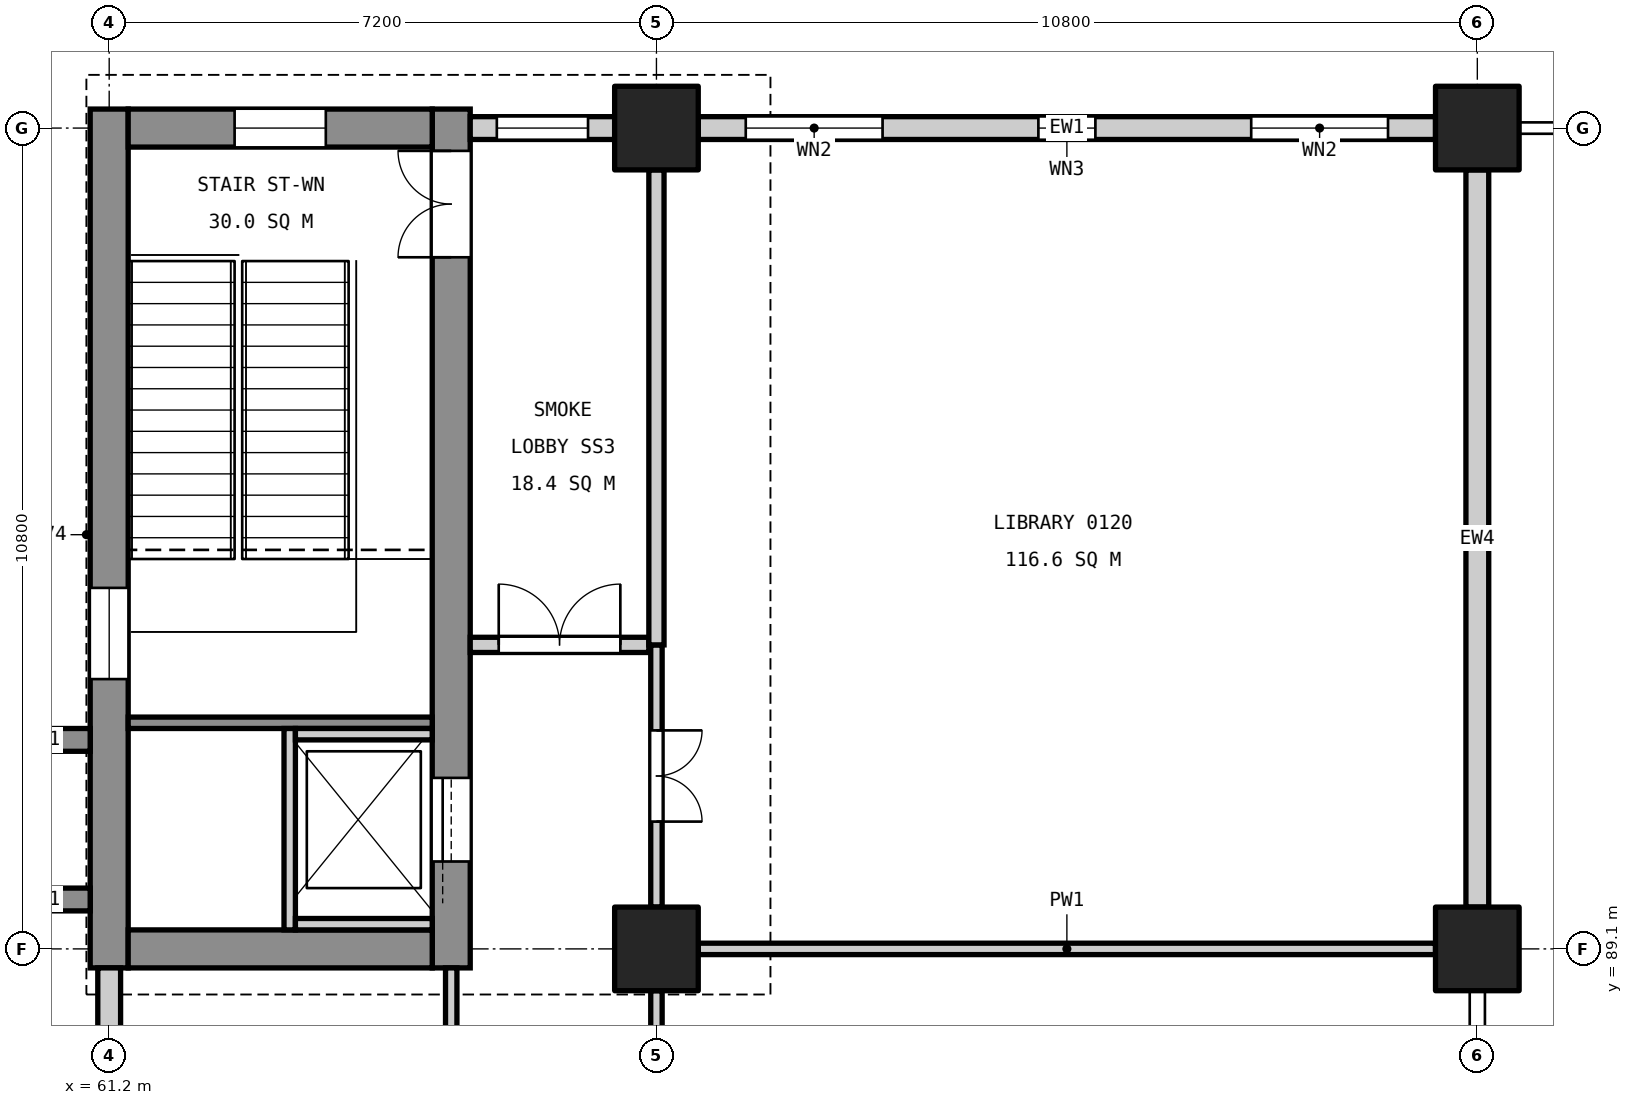
"""IFC4 building model, lengths in metres.
Left out: names, types, materials, properties, quantities, classifications, styles, units other than length and angle.
Written with IfcOpenShell. Run it as: python <this file> out.ifc"""

import sys

from ifc_helpers import new_model, si_unit, direction, frame, frame_2d, origin, origin_2d, place, context, subcontext, project, spatial, rectangle, extrude, element, fill, save


model = new_model("IFC4")
c1 = context("Model", 3, precision=1e-05, world=origin(), true_north=direction((0.0, 1.0)))
c2 = subcontext(c1, "Body", "Model", "MODEL_VIEW")
j1 = project(units=[si_unit("LENGTHUNIT", "METRE"), si_unit("PLANEANGLEUNIT", "RADIAN")], contexts=[c1])
p1 = place(None, origin())
s1 = spatial("IfcSite", under=j1, at=p1, CompositionType="ELEMENT")
p2 = place(p1, origin())
s2 = spatial("IfcBuilding", under=s1, at=p2, CompositionType="ELEMENT")
p3 = place(p2, frame((0.0, 0.0, 6.0)))
s3 = spatial("IfcBuildingStorey", under=s2, at=p3, CompositionType="ELEMENT", Elevation=6.0)
for number, where, z_axis, x_axis in (
    (1, (68.4, 89.1, 0.0), (0.0, 0.0, 1.0), (1.0, 0.0, 0.0)),
    (2, (68.4, 99.9, 0.0), (0.0, 0.0, 1.0), (1.0, 0.0, 0.0)),
    (3, (79.2, 89.1, 0.0), (0.0, 0.0, 1.0), (1.0, 0.0, 0.0)),
    (4, (79.2, 99.9, 0.0), (0.0, 0.0, 1.0), (1.0, 0.0, 0.0)),
):
    element("IfcColumn", number, at=place(p3, frame(where, z_axis=z_axis, x_axis=x_axis)), inside=s3, PredefinedType="COLUMN", context=c2, shape_type="SweptSolid", body=[
        extrude(rectangle(XDim=1.1, YDim=1.1, at=origin_2d()), origin(), (0.0, 0.0, 1.0), 5.4),
    ])
p4 = place(p3, frame((61.2, 88.85, 0.0), z_axis=(0.0, 0.0, 1.0), x_axis=(0.0, 1.0, 0.0)))
e5 = element("IfcWall", 5, at=p4, inside=s3, PredefinedType="SHEAR", context=c2, shape_type="SweptSolid", body=[
    extrude(rectangle(XDim=11.3, YDim=0.5, at=frame_2d((5.65, 0.0))), origin(), (0.0, 0.0, 1.0), 5.1),
])
p5 = place(p4, frame((3.8, 0.0, 3.4)))
e6 = element("IfcOpeningElement", 6, at=p5, cuts=e5, PredefinedType="OPENING", context=c2, shape_type="SweptSolid", body=[
    extrude(rectangle(XDim=1.2, YDim=0.9, at=frame_2d((0.6, 0.45))), frame((0.0, 0.26, 0.0), z_axis=(0.0, -1.0, 0.0), x_axis=(1.0, 0.0, 0.0)), (0.0, 0.0, 1.0), 0.52),
])
p6 = place(p3, frame((65.7, 88.85, 0.0), z_axis=(0.0, 0.0, 1.0), x_axis=(0.0, 1.0, 0.0)))
e7 = element("IfcWall", 7, at=p6, inside=s3, PredefinedType="SHEAR", context=c2, shape_type="SweptSolid", body=[
    extrude(rectangle(XDim=11.3, YDim=0.5, at=frame_2d((5.65, 0.0))), origin(), (0.0, 0.0, 1.0), 5.1),
])
p7 = place(p6, frame((9.35, 0.0, 0.0)))
e8 = element("IfcOpeningElement", 8, at=p7, cuts=e7, PredefinedType="OPENING", context=c2, shape_type="SweptSolid", body=[
    extrude(rectangle(XDim=1.4, YDim=2.1, at=frame_2d((0.7, 1.05))), frame((0.0, 0.26, 0.0), z_axis=(0.0, -1.0, 0.0), x_axis=(1.0, 0.0, 0.0)), (0.0, 0.0, 1.0), 0.52),
])
p8 = place(p6, frame((1.4, 0.0, 0.0)))
e9 = element("IfcOpeningElement", 9, at=p8, cuts=e7, PredefinedType="OPENING", context=c2, shape_type="SweptSolid", body=[
    extrude(rectangle(XDim=1.1, YDim=2.1, at=frame_2d((0.55, 1.05))), frame((0.0, 0.26, 0.0), z_axis=(0.0, -1.0, 0.0), x_axis=(1.0, 0.0, 0.0)), (0.0, 0.0, 1.0), 0.52),
])
p9 = place(p3, frame((61.45, 89.1, 0.0), z_axis=(0.0, 0.0, 1.0), x_axis=(1.0, 0.0, 0.0)))
e10 = element("IfcWall", 10, at=p9, inside=s3, PredefinedType="SHEAR", context=c2, shape_type="SweptSolid", body=[
    extrude(rectangle(XDim=4.0, YDim=0.5, at=frame_2d((2.0, 0.0))), origin(), (0.0, 0.0, 1.0), 5.1),
])
p10 = place(p3, frame((61.45, 99.9, 0.0), z_axis=(0.0, 0.0, 1.0), x_axis=(1.0, 0.0, 0.0)))
e11 = element("IfcWall", 11, at=p10, inside=s3, PredefinedType="SHEAR", context=c2, shape_type="SweptSolid", body=[
    extrude(rectangle(XDim=4.0, YDim=0.5, at=frame_2d((2.0, 0.0))), origin(), (0.0, 0.0, 1.0), 5.1),
])
p11 = place(p10, frame((1.4, 0.0, 3.4)))
e12 = element("IfcOpeningElement", 12, at=p11, cuts=e11, PredefinedType="OPENING", context=c2, shape_type="SweptSolid", body=[
    extrude(rectangle(XDim=1.2, YDim=0.9, at=frame_2d((0.6, 0.45))), frame((0.0, 0.26, 0.0), z_axis=(0.0, -1.0, 0.0), x_axis=(1.0, 0.0, 0.0)), (0.0, 0.0, 1.0), 0.52),
])
for number, where, z_axis, x_axis in (
    (13, (60.95, 89.75, 0.0), (0.0, 0.0, 1.0), (-1.0, 0.0, 0.0)),
    (14, (60.95, 91.85, 0.0), (0.0, 0.0, 1.0), (-1.0, 0.0, 0.0)),
):
    element("IfcWall", number, at=place(p3, frame(where, z_axis=z_axis, x_axis=x_axis)), inside=s3, PredefinedType="SHEAR", context=c2, shape_type="SweptSolid", body=[
        extrude(rectangle(XDim=1.25, YDim=0.3, at=frame_2d((0.625, 0.0))), origin(), (0.0, 0.0, 1.0), 5.4),
    ])
p12 = place(p3, frame((61.45, 92.075, 0.0), z_axis=(0.0, 0.0, 1.0), x_axis=(1.0, 0.0, 0.0)))
e15 = element("IfcWall", 15, at=p12, inside=s3, PredefinedType="SOLIDWALL", context=c2, shape_type="SweptSolid", body=[
    extrude(rectangle(XDim=4.0, YDim=0.15, at=frame_2d((2.0, 0.0))), origin(), (0.0, 0.0, 1.0), 5.1),
])
p13 = place(p3, frame((63.575, 92.0, 0.0), z_axis=(0.0, 0.0, 1.0), x_axis=(0.0, -1.0, 0.0)))
e16 = element("IfcWall", 16, at=p13, inside=s3, PredefinedType="SOLIDWALL", context=c2, shape_type="SweptSolid", body=[
    extrude(rectangle(XDim=2.65, YDim=0.15, at=frame_2d((1.325, 0.0))), origin(), (0.0, 0.0, 1.0), 5.4),
])
for number, where, z_axis, x_axis in (
    (17, (63.65, 91.925, 0.0), (0.0, 0.0, 1.0), (1.0, 0.0, 0.0)),
    (18, (63.65, 89.425, 0.0), (0.0, 0.0, 1.0), (1.0, 0.0, 0.0)),
):
    element("IfcWall", number, at=place(p3, frame(where, z_axis=z_axis, x_axis=x_axis)), inside=s3, PredefinedType="SOLIDWALL", context=c2, shape_type="SweptSolid", body=[
        extrude(rectangle(XDim=1.8, YDim=0.15, at=frame_2d((0.9, 0.0))), origin(), (0.0, 0.0, 1.0), 5.4),
    ])
p14 = place(p3, frame((61.2, 78.85, 0.0), z_axis=(0.0, 0.0, 1.0), x_axis=(0.0, 1.0, 0.0)))
e19 = element("IfcWall", 19, at=p14, inside=s3, PredefinedType="STANDARD", context=c2, shape_type="SweptSolid", body=[
    extrude(rectangle(XDim=10.0, YDim=0.3, at=frame_2d((5.0, 0.0))), origin(), (0.0, 0.0, 1.0), 4.1),
])
p15 = place(p14, frame((0.625, 0.0, 0.9)))
e20 = element("IfcOpeningElement", 20, at=p15, cuts=e19, PredefinedType="OPENING", context=c2, shape_type="SweptSolid", body=[
    extrude(rectangle(XDim=1.8, YDim=3.0, at=frame_2d((0.9, 1.5))), frame((0.0, 0.16, 0.0), z_axis=(0.0, -1.0, 0.0), x_axis=(1.0, 0.0, 0.0)), (0.0, 0.0, 1.0), 0.32),
])
p16 = place(p14, frame((3.95, 0.0, 0.9)))
e21 = element("IfcOpeningElement", 21, at=p16, cuts=e19, PredefinedType="OPENING", context=c2, shape_type="SweptSolid", body=[
    extrude(rectangle(XDim=1.8, YDim=3.0, at=frame_2d((0.9, 1.5))), frame((0.0, 0.16, 0.0), z_axis=(0.0, -1.0, 0.0), x_axis=(1.0, 0.0, 0.0)), (0.0, 0.0, 1.0), 0.32),
])
p17 = place(p14, frame((7.95, 0.0, 0.8)))
e22 = element("IfcOpeningElement", 22, at=p17, cuts=e19, PredefinedType="OPENING", context=c2, shape_type="SweptSolid", body=[
    extrude(rectangle(XDim=0.75, YDim=1.2, at=frame_2d((0.375, 0.6))), frame((0.0, 0.16, 0.0), z_axis=(0.0, -1.0, 0.0), x_axis=(1.0, 0.0, 0.0)), (0.0, 0.0, 1.0), 0.32),
])
p18 = place(p3, frame((65.95, 99.9, 0.0), z_axis=(0.0, 0.0, 1.0), x_axis=(1.0, 0.0, 0.0)))
e23 = element("IfcWall", 23, at=p18, inside=s3, PredefinedType="STANDARD", context=c2, shape_type="SweptSolid", body=[
    extrude(rectangle(XDim=1.9, YDim=0.3, at=frame_2d((0.95, 0.0))), origin(), (0.0, 0.0, 1.0), 4.3),
])
p19 = place(p18, frame((0.35, 0.0, 0.9)))
e24 = element("IfcOpeningElement", 24, at=p19, cuts=e23, PredefinedType="OPENING", context=c2, shape_type="SweptSolid", body=[
    extrude(rectangle(XDim=1.2, YDim=2.4, at=frame_2d((0.6, 1.2))), frame((0.0, 0.16, 0.0), z_axis=(0.0, -1.0, 0.0), x_axis=(1.0, 0.0, 0.0)), (0.0, 0.0, 1.0), 0.32),
])
p20 = place(p3, frame((68.95, 99.9, 0.0), z_axis=(0.0, 0.0, 1.0), x_axis=(1.0, 0.0, 0.0)))
e25 = element("IfcWall", 25, at=p20, inside=s3, PredefinedType="STANDARD", context=c2, shape_type="SweptSolid", body=[
    extrude(rectangle(XDim=9.7, YDim=0.3, at=frame_2d((4.85, 0.0))), origin(), (0.0, 0.0, 1.0), 4.3),
])
p21 = place(p20, frame((0.625, 0.0, 0.9)))
e26 = element("IfcOpeningElement", 26, at=p21, cuts=e25, PredefinedType="OPENING", context=c2, shape_type="SweptSolid", body=[
    extrude(rectangle(XDim=1.8, YDim=3.0, at=frame_2d((0.9, 1.5))), frame((0.0, 0.16, 0.0), z_axis=(0.0, -1.0, 0.0), x_axis=(1.0, 0.0, 0.0)), (0.0, 0.0, 1.0), 0.32),
])
p22 = place(p20, frame((4.475, 0.0, 0.8)))
e27 = element("IfcOpeningElement", 27, at=p22, cuts=e25, PredefinedType="OPENING", context=c2, shape_type="SweptSolid", body=[
    extrude(rectangle(XDim=0.75, YDim=1.2, at=frame_2d((0.375, 0.6))), frame((0.0, 0.16, 0.0), z_axis=(0.0, -1.0, 0.0), x_axis=(1.0, 0.0, 0.0)), (0.0, 0.0, 1.0), 0.32),
])
p23 = place(p20, frame((7.275, 0.0, 0.9)))
e28 = element("IfcOpeningElement", 28, at=p23, cuts=e25, PredefinedType="OPENING", context=c2, shape_type="SweptSolid", body=[
    extrude(rectangle(XDim=1.8, YDim=3.0, at=frame_2d((0.9, 1.5))), frame((0.0, 0.16, 0.0), z_axis=(0.0, -1.0, 0.0), x_axis=(1.0, 0.0, 0.0)), (0.0, 0.0, 1.0), 0.32),
])
p24 = place(p3, frame((79.2, 89.65, 0.0), z_axis=(0.0, 0.0, 1.0), x_axis=(0.0, 1.0, 0.0)))
e29 = element("IfcWall", 29, at=p24, inside=s3, PredefinedType="STANDARD", context=c2, shape_type="SweptSolid", body=[
    extrude(rectangle(XDim=9.7, YDim=0.3, at=frame_2d((4.85, 0.0))), origin(), (0.0, 0.0, 1.0), 4.0),
])
p25 = place(p3, frame((65.7, 78.45, 0.0), z_axis=(0.0, 0.0, 1.0), x_axis=(0.0, 1.0, 0.0)))
e30 = element("IfcWall", 30, at=p25, inside=s3, PredefinedType="PARTITIONING", context=c2, shape_type="SweptSolid", body=[
    extrude(rectangle(XDim=10.4, YDim=0.15, at=frame_2d((5.2, 0.0))), origin(), (0.0, 0.0, 1.0), 4.0),
])
p26 = place(p25, frame((1.15, 0.0, 0.0)))
e31 = element("IfcOpeningElement", 31, at=p26, cuts=e30, PredefinedType="OPENING", context=c2, shape_type="SweptSolid", body=[
    extrude(rectangle(XDim=1.0, YDim=2.1, at=frame_2d((0.5, 1.05))), frame((0.0, 0.085, 0.0), z_axis=(0.0, -1.0, 0.0), x_axis=(1.0, 0.0, 0.0)), (0.0, 0.0, 1.0), 0.17),
])
p27 = place(p25, frame((6.55, 0.0, 0.0)))
e32 = element("IfcOpeningElement", 32, at=p27, cuts=e30, PredefinedType="OPENING", context=c2, shape_type="SweptSolid", body=[
    extrude(rectangle(XDim=1.0, YDim=2.1, at=frame_2d((0.5, 1.05))), frame((0.0, 0.085, 0.0), z_axis=(0.0, -1.0, 0.0), x_axis=(1.0, 0.0, 0.0)), (0.0, 0.0, 1.0), 0.17),
])
p28 = place(p3, frame((65.95, 93.1, 0.0), z_axis=(0.0, 0.0, 1.0), x_axis=(1.0, 0.0, 0.0)))
e33 = element("IfcWall", 33, at=p28, inside=s3, PredefinedType="PARTITIONING", context=c2, shape_type="SweptSolid", body=[
    extrude(rectangle(XDim=2.35, YDim=0.2, at=frame_2d((1.175, 0.0))), origin(), (0.0, 0.0, 1.0), 4.0),
])
p29 = place(p28, frame((0.375, 0.0, 0.0)))
e34 = element("IfcOpeningElement", 34, at=p29, cuts=e33, PredefinedType="OPENING", context=c2, shape_type="SweptSolid", body=[
    extrude(rectangle(XDim=1.6, YDim=2.1, at=frame_2d((0.8, 1.05))), frame((0.0, 0.11, 0.0), z_axis=(0.0, -1.0, 0.0), x_axis=(1.0, 0.0, 0.0)), (0.0, 0.0, 1.0), 0.22),
])
p30 = place(p3, frame((68.4, 78.85, 0.0), z_axis=(0.0, 0.0, 1.0), x_axis=(0.0, 1.0, 0.0)))
e35 = element("IfcWall", 35, at=p30, inside=s3, PredefinedType="PARTITIONING", context=c2, shape_type="SweptSolid", body=[
    extrude(rectangle(XDim=9.7, YDim=0.15, at=frame_2d((4.85, 0.0))), origin(), (0.0, 0.0, 1.0), 4.0),
])
p31 = place(p30, frame((4.25, 0.0, 0.0)))
e36 = element("IfcOpeningElement", 36, at=p31, cuts=e35, PredefinedType="OPENING", context=c2, shape_type="SweptSolid", body=[
    extrude(rectangle(XDim=1.2, YDim=2.1, at=frame_2d((0.6, 1.05))), frame((0.0, 0.085, 0.0), z_axis=(0.0, -1.0, 0.0), x_axis=(1.0, 0.0, 0.0)), (0.0, 0.0, 1.0), 0.17),
])
p32 = place(p3, frame((68.4, 89.65, 0.0), z_axis=(0.0, 0.0, 1.0), x_axis=(0.0, 1.0, 0.0)))
e37 = element("IfcWall", 37, at=p32, inside=s3, PredefinedType="PARTITIONING", context=c2, shape_type="SweptSolid", body=[
    extrude(rectangle(XDim=3.45, YDim=0.15, at=frame_2d((1.725, 0.0))), origin(), (0.0, 0.0, 1.0), 4.0),
])
p33 = place(p32, frame((1.125, 0.0, 0.0)))
e38 = element("IfcOpeningElement", 38, at=p33, cuts=e37, PredefinedType="OPENING", context=c2, shape_type="SweptSolid", body=[
    extrude(rectangle(XDim=1.2, YDim=2.1, at=frame_2d((0.6, 1.05))), frame((0.0, 0.085, 0.0), z_axis=(0.0, -1.0, 0.0), x_axis=(1.0, 0.0, 0.0)), (0.0, 0.0, 1.0), 0.17),
])
p34 = place(p3, frame((68.4, 93.1, 0.0), z_axis=(0.0, 0.0, 1.0), x_axis=(0.0, 1.0, 0.0)))
e39 = element("IfcWall", 39, at=p34, inside=s3, PredefinedType="PARTITIONING", context=c2, shape_type="SweptSolid", body=[
    extrude(rectangle(XDim=6.25, YDim=0.2, at=frame_2d((3.125, 0.0))), origin(), (0.0, 0.0, 1.0), 4.0),
])
p35 = place(p3, frame((68.95, 89.1, 0.0), z_axis=(0.0, 0.0, 1.0), x_axis=(1.0, 0.0, 0.0)))
e40 = element("IfcWall", 40, at=p35, inside=s3, PredefinedType="PARTITIONING", context=c2, shape_type="SweptSolid", body=[
    extrude(rectangle(XDim=9.7, YDim=0.15, at=frame_2d((4.85, 0.0))), origin(), (0.0, 0.0, 1.0), 4.3),
])
p36 = place(p7, origin())
e41 = element("IfcDoor", 41, at=p36, inside=s3, OperationType="DOUBLE_DOOR_SINGLE_SWING", PredefinedType="DOOR", context=c2, shape_type="SweptSolid", body=[
    extrude(rectangle(XDim=1.4, YDim=2.1, at=frame_2d((0.7, 1.05))), frame((0.0, 0.025, 0.0), z_axis=(0.0, -1.0, 0.0), x_axis=(1.0, 0.0, 0.0)), (0.0, 0.0, 1.0), 0.05),
])
fill(e8, e41)
p37 = place(p8, origin())
e42 = element("IfcDoor", 42, at=p37, inside=s3, OperationType="SLIDING_TO_LEFT", PredefinedType="DOOR", context=c2, shape_type="SweptSolid", body=[
    extrude(rectangle(XDim=1.1, YDim=2.1, at=frame_2d((0.55, 1.05))), frame((0.0, 0.025, 0.0), z_axis=(0.0, -1.0, 0.0), x_axis=(1.0, 0.0, 0.0)), (0.0, 0.0, 1.0), 0.05),
])
fill(e9, e42)
p38 = place(p19, origin())
e43 = element("IfcWindow", 43, at=p38, inside=s3, PartitioningType="SINGLE_PANEL", PredefinedType="WINDOW", context=c2, shape_type="SweptSolid", body=[
    extrude(rectangle(XDim=1.2, YDim=2.4, at=frame_2d((0.6, 1.2))), frame((0.0, 0.03, 0.0), z_axis=(0.0, -1.0, 0.0), x_axis=(1.0, 0.0, 0.0)), (0.0, 0.0, 1.0), 0.06),
])
fill(e24, e43)
p39 = place(p21, origin())
e44 = element("IfcWindow", 44, at=p39, inside=s3, PartitioningType="SINGLE_PANEL", PredefinedType="WINDOW", context=c2, shape_type="SweptSolid", body=[
    extrude(rectangle(XDim=1.8, YDim=3.0, at=frame_2d((0.9, 1.5))), frame((0.0, 0.03, 0.0), z_axis=(0.0, -1.0, 0.0), x_axis=(1.0, 0.0, 0.0)), (0.0, 0.0, 1.0), 0.06),
])
fill(e26, e44)
p40 = place(p22, origin())
e45 = element("IfcWindow", 45, at=p40, inside=s3, PartitioningType="SINGLE_PANEL", PredefinedType="WINDOW", context=c2, shape_type="SweptSolid", body=[
    extrude(rectangle(XDim=0.75, YDim=1.2, at=frame_2d((0.375, 0.6))), frame((0.0, 0.03, 0.0), z_axis=(0.0, -1.0, 0.0), x_axis=(1.0, 0.0, 0.0)), (0.0, 0.0, 1.0), 0.06),
])
fill(e27, e45)
p41 = place(p23, origin())
e46 = element("IfcWindow", 46, at=p41, inside=s3, PartitioningType="SINGLE_PANEL", PredefinedType="WINDOW", context=c2, shape_type="SweptSolid", body=[
    extrude(rectangle(XDim=1.8, YDim=3.0, at=frame_2d((0.9, 1.5))), frame((0.0, 0.03, 0.0), z_axis=(0.0, -1.0, 0.0), x_axis=(1.0, 0.0, 0.0)), (0.0, 0.0, 1.0), 0.06),
])
fill(e28, e46)
p42 = place(p5, origin())
e47 = element("IfcWindow", 47, at=p42, inside=s3, PartitioningType="SINGLE_PANEL", PredefinedType="WINDOW", context=c2, shape_type="SweptSolid", body=[
    extrude(rectangle(XDim=1.2, YDim=0.9, at=frame_2d((0.6, 0.45))), frame((0.0, 0.03, 0.0), z_axis=(0.0, -1.0, 0.0), x_axis=(1.0, 0.0, 0.0)), (0.0, 0.0, 1.0), 0.06),
])
fill(e6, e47)
p43 = place(p11, origin())
e48 = element("IfcWindow", 48, at=p43, inside=s3, PartitioningType="SINGLE_PANEL", PredefinedType="WINDOW", context=c2, shape_type="SweptSolid", body=[
    extrude(rectangle(XDim=1.2, YDim=0.9, at=frame_2d((0.6, 0.45))), frame((0.0, 0.03, 0.0), z_axis=(0.0, -1.0, 0.0), x_axis=(1.0, 0.0, 0.0)), (0.0, 0.0, 1.0), 0.06),
])
fill(e12, e48)
p44 = place(p33, frame((1.2, 0.0, 0.0), z_axis=(0.0, 0.0, 1.0), x_axis=(-1.0, 0.0, 0.0)))
e49 = element("IfcDoor", 49, at=p44, inside=s3, OperationType="DOUBLE_DOOR_SINGLE_SWING", PredefinedType="DOOR", context=c2, shape_type="SweptSolid", body=[
    extrude(rectangle(XDim=1.2, YDim=2.1, at=frame_2d((0.6, 1.05))), frame((0.0, 0.025, 0.0), z_axis=(0.0, -1.0, 0.0), x_axis=(1.0, 0.0, 0.0)), (0.0, 0.0, 1.0), 0.05),
])
fill(e38, e49)
p45 = place(p29, origin())
e50 = element("IfcDoor", 50, at=p45, inside=s3, OperationType="DOUBLE_DOOR_SINGLE_SWING", PredefinedType="DOOR", context=c2, shape_type="SweptSolid", body=[
    extrude(rectangle(XDim=1.6, YDim=2.1, at=frame_2d((0.8, 1.05))), frame((0.0, 0.025, 0.0), z_axis=(0.0, -1.0, 0.0), x_axis=(1.0, 0.0, 0.0)), (0.0, 0.0, 1.0), 0.05),
])
fill(e34, e50)
save(model, sys.argv[1])
